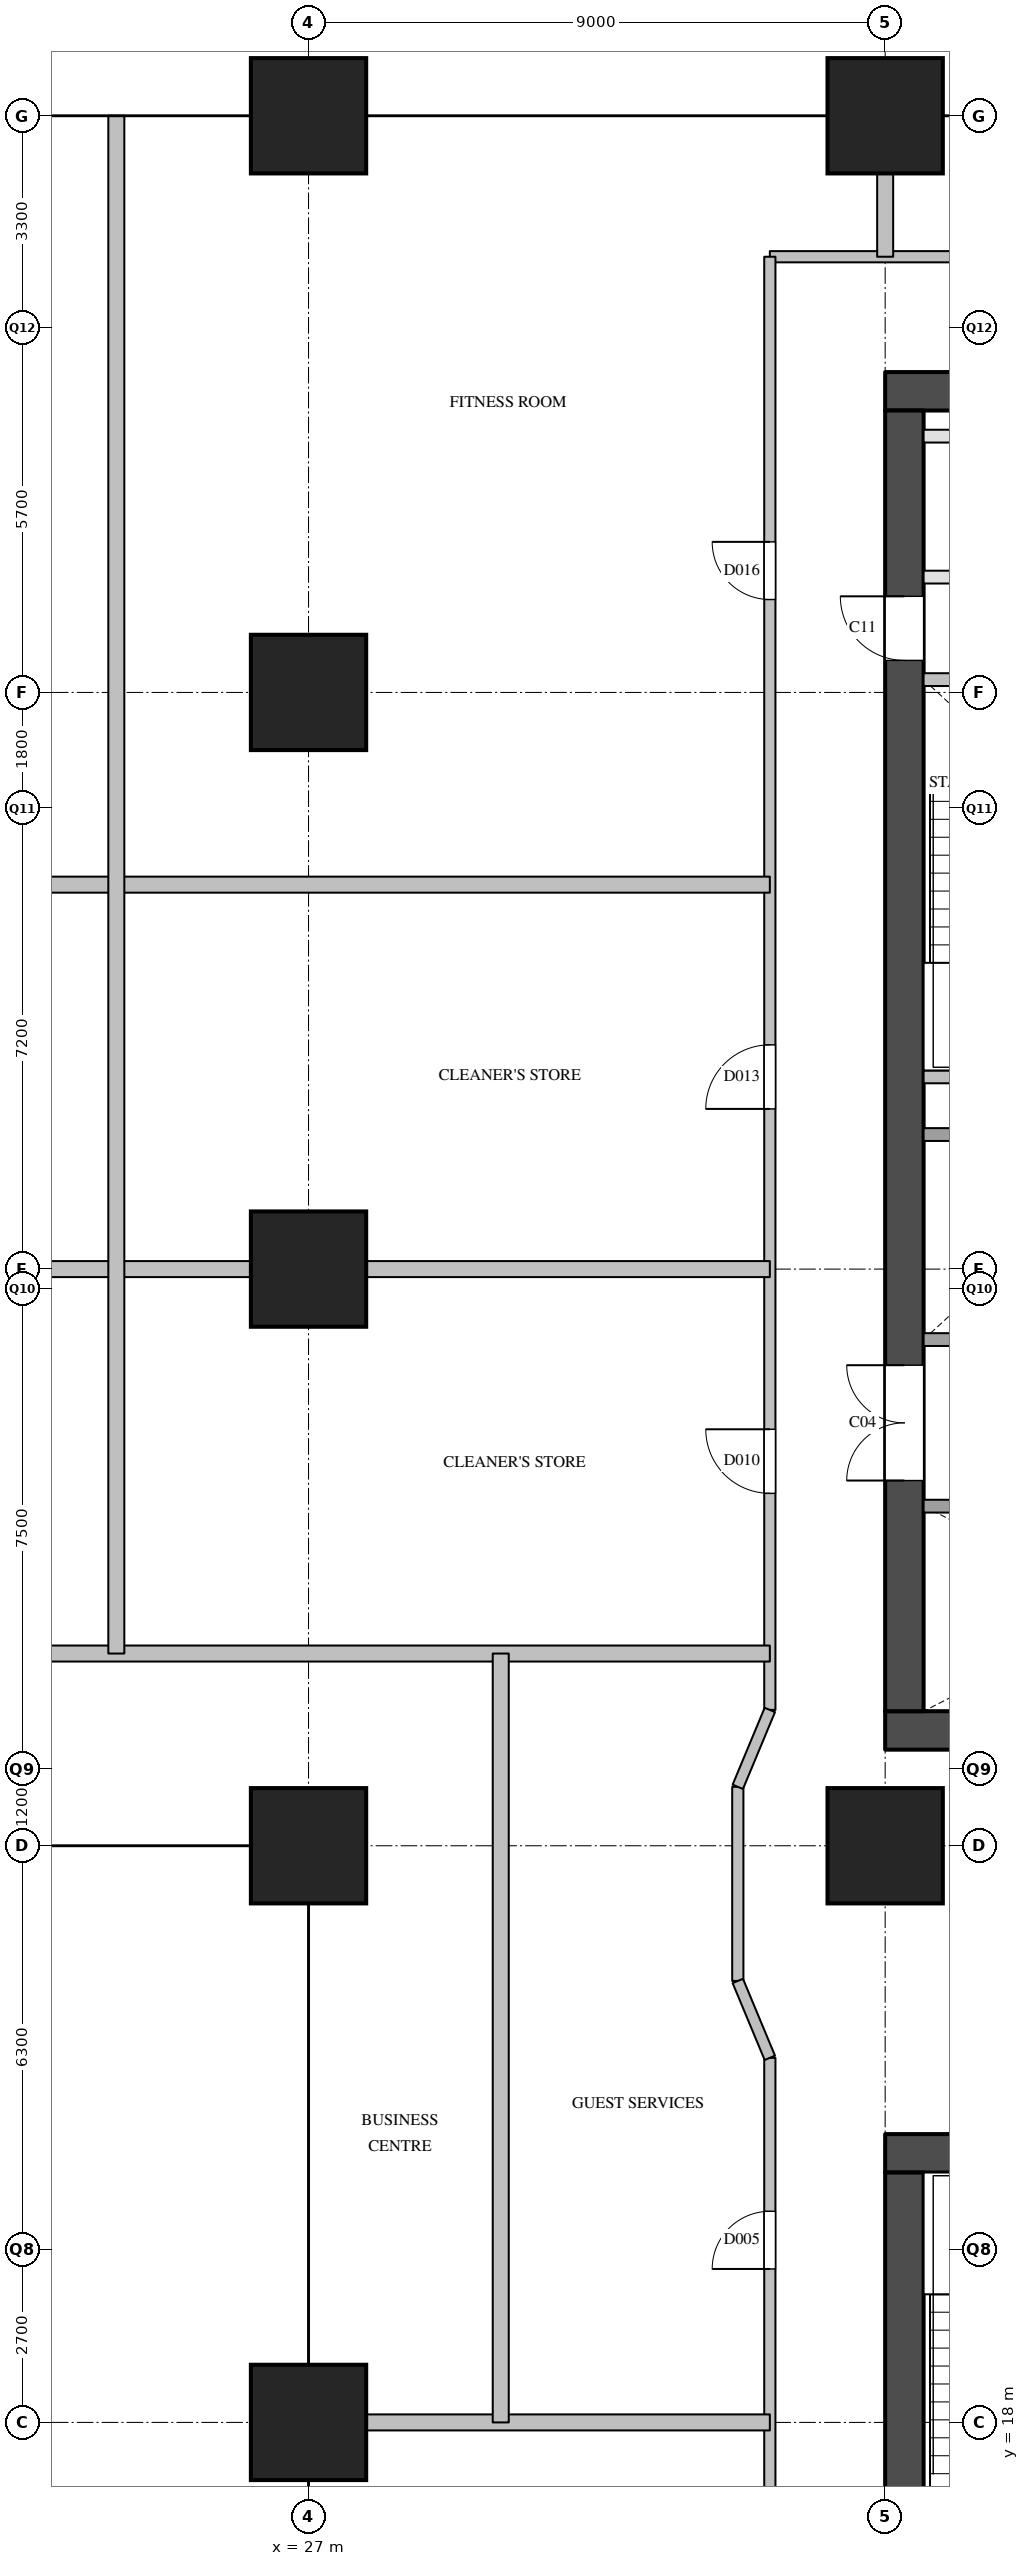
"""IFC4 building model, lengths in metres.
Left out: names, types, materials, properties, quantities, classifications, styles, units other than length and angle.
Written with IfcOpenShell. Run it as: python <this file> out.ifc"""

import sys

from ifc_helpers import new_model, si_unit, direction, frame, frame_2d, origin, origin_2d, place, context, subcontext, project, spatial, rectangle, extrude, element, fill, save


model = new_model("IFC4")
c1 = context("Model", 3, precision=1e-05, world=origin(), true_north=direction((0.0, 1.0)))
c2 = subcontext(c1, "Body", "Model", "MODEL_VIEW")
j1 = project(units=[si_unit("LENGTHUNIT", "METRE"), si_unit("PLANEANGLEUNIT", "RADIAN")], contexts=[c1])
p1 = place(None, origin())
s1 = spatial("IfcSite", under=j1, at=p1, CompositionType="ELEMENT")
p2 = place(p1, origin())
s2 = spatial("IfcBuilding", under=s1, at=p2, CompositionType="ELEMENT")
p3 = place(p2, frame((0.0, 0.0, 115.8)))
s3 = spatial("IfcBuildingStorey", under=s2, at=p3, CompositionType="ELEMENT", Elevation=115.8)
for number, where, z_axis, x_axis in (
    (1, (27.0, 18.0, 0.0), (0.0, 0.0, 1.0), (1.0, 0.0, 0.0)),
    (2, (27.0, 27.0, 0.0), (0.0, 0.0, 1.0), (1.0, 0.0, 0.0)),
    (3, (27.0, 36.0, 0.0), (0.0, 0.0, 1.0), (1.0, 0.0, 0.0)),
    (4, (27.0, 45.0, 0.0), (0.0, 0.0, 1.0), (1.0, 0.0, 0.0)),
    (5, (27.0, 54.0, 0.0), (0.0, 0.0, 1.0), (1.0, 0.0, 0.0)),
    (6, (36.0, 27.0, 0.0), (0.0, 0.0, 1.0), (1.0, 0.0, 0.0)),
    (7, (36.0, 54.0, 0.0), (0.0, 0.0, 1.0), (1.0, 0.0, 0.0)),
):
    element("IfcColumn", number, at=place(p3, frame(where, z_axis=z_axis, x_axis=x_axis)), inside=s3, PredefinedType="COLUMN", context=c2, shape_type="SweptSolid", body=[
        extrude(rectangle(XDim=1.8, YDim=1.8, at=origin_2d()), origin(), (0.0, 0.0, 1.0), 3.8),
    ])
for number, where, z_axis, x_axis in (
    (8, (36.0, 28.8, 0.0), (0.0, 0.0, 1.0), (1.0, 0.0, 0.0)),
    (9, (36.0, 49.7, 0.0), (0.0, 0.0, 1.0), (1.0, 0.0, 0.0)),
):
    element("IfcWall", number, at=place(p3, frame(where, z_axis=z_axis, x_axis=x_axis)), inside=s3, PredefinedType="SHEAR", context=c2, shape_type="SweptSolid", body=[
        extrude(rectangle(XDim=12.4, YDim=0.6, at=frame_2d((6.2, 0.0))), origin(), (0.0, 0.0, 1.0), 3.5),
    ])
p4 = place(p3, frame((36.3, 29.1, 0.0), z_axis=(0.0, 0.0, 1.0), x_axis=(0.0, 1.0, 0.0)))
e10 = element("IfcWall", 10, at=p4, inside=s3, PredefinedType="SHEAR", context=c2, shape_type="SweptSolid", body=[
    extrude(rectangle(XDim=20.3, YDim=0.6, at=frame_2d((10.15, 0.0))), origin(), (0.0, 0.0, 1.0), 3.5),
])
p5 = place(p4, frame((3.6, 0.0, 0.0)))
e11 = element("IfcOpeningElement", 11, at=p5, cuts=e10, PredefinedType="OPENING", context=c2, shape_type="SweptSolid", body=[
    extrude(rectangle(XDim=1.8, YDim=2.1, at=frame_2d((0.9, 1.05))), frame((0.0, 0.31, 0.0), z_axis=(0.0, -1.0, 0.0), x_axis=(1.0, 0.0, 0.0)), (0.0, 0.0, 1.0), 0.62),
])
p6 = place(p4, frame((16.4, 0.0, 0.0)))
e12 = element("IfcOpeningElement", 12, at=p6, cuts=e10, PredefinedType="OPENING", context=c2, shape_type="SweptSolid", body=[
    extrude(rectangle(XDim=1.0, YDim=2.1, at=frame_2d((0.5, 1.05))), frame((0.0, 0.31, 0.0), z_axis=(0.0, -1.0, 0.0), x_axis=(1.0, 0.0, 0.0)), (0.0, 0.0, 1.0), 0.62),
])
p7 = place(p3, frame((36.6, 32.3, 0.0), z_axis=(0.0, 0.0, 1.0), x_axis=(1.0, 0.0, 0.0)))
e13 = element("IfcWall", 13, at=p7, inside=s3, PredefinedType="SOLIDWALL", context=c2, shape_type="SweptSolid", body=[
    extrude(rectangle(XDim=11.2, YDim=0.2, at=frame_2d((5.6, 0.0))), origin(), (0.0, 0.0, 1.0), 3.5),
])
p8 = place(p7, frame((7.225, 0.0, 0.0)))
e14 = element("IfcOpeningElement", 14, at=p8, cuts=e13, PredefinedType="OPENING", context=c2, shape_type="SweptSolid", body=[
    extrude(rectangle(XDim=1.2, YDim=2.1, at=frame_2d((0.6, 1.05))), frame((0.0, 0.11, 0.0), z_axis=(0.0, -1.0, 0.0), x_axis=(1.0, 0.0, 0.0)), (0.0, 0.0, 1.0), 0.22),
])
p9 = place(p7, frame((9.475, 0.0, 0.0)))
e15 = element("IfcOpeningElement", 15, at=p9, cuts=e13, PredefinedType="OPENING", context=c2, shape_type="SweptSolid", body=[
    extrude(rectangle(XDim=1.2, YDim=2.1, at=frame_2d((0.6, 1.05))), frame((0.0, 0.11, 0.0), z_axis=(0.0, -1.0, 0.0), x_axis=(1.0, 0.0, 0.0)), (0.0, 0.0, 1.0), 0.22),
])
p10 = place(p3, frame((36.6, 34.9, 0.0), z_axis=(0.0, 0.0, 1.0), x_axis=(1.0, 0.0, 0.0)))
e16 = element("IfcWall", 16, at=p10, inside=s3, PredefinedType="SOLIDWALL", context=c2, shape_type="SweptSolid", body=[
    extrude(rectangle(XDim=6.3, YDim=0.2, at=frame_2d((3.15, 0.0))), origin(), (0.0, 0.0, 1.0), 3.5),
])
p11 = place(p3, frame((36.6, 38.1, 0.0), z_axis=(0.0, 0.0, 1.0), x_axis=(1.0, 0.0, 0.0)))
e17 = element("IfcWall", 17, at=p11, inside=s3, PredefinedType="SOLIDWALL", context=c2, shape_type="SweptSolid", body=[
    extrude(rectangle(XDim=6.7, YDim=0.2, at=frame_2d((3.35, 0.0))), origin(), (0.0, 0.0, 1.0), 3.5),
])
p12 = place(p3, frame((36.6, 39.0, 0.0), z_axis=(0.0, 0.0, 1.0), x_axis=(1.0, 0.0, 0.0)))
e18 = element("IfcWall", 18, at=p12, inside=s3, PredefinedType="SOLIDWALL", context=c2, shape_type="SweptSolid", body=[
    extrude(rectangle(XDim=3.25, YDim=0.2, at=frame_2d((1.625, 0.0))), origin(), (0.0, 0.0, 1.0), 3.5),
])
p13 = place(p3, frame((36.6, 45.2, 0.0), z_axis=(0.0, 0.0, 1.0), x_axis=(1.0, 0.0, 0.0)))
e19 = element("IfcWall", 19, at=p13, inside=s3, PredefinedType="SOLIDWALL", context=c2, shape_type="SweptSolid", body=[
    extrude(rectangle(XDim=10.05, YDim=0.2, at=frame_2d((5.025, 0.0))), origin(), (0.0, 0.0, 1.0), 3.5),
])
p14 = place(p13, frame((1.125, 0.0, 0.0)))
e20 = element("IfcOpeningElement", 20, at=p14, cuts=e19, PredefinedType="OPENING", context=c2, shape_type="SweptSolid", body=[
    extrude(rectangle(XDim=1.1, YDim=2.1, at=frame_2d((0.55, 1.05))), frame((0.0, 0.11, 0.0), z_axis=(0.0, -1.0, 0.0), x_axis=(1.0, 0.0, 0.0)), (0.0, 0.0, 1.0), 0.22),
])
p15 = place(p13, frame((4.475, 0.0, 0.0)))
e21 = element("IfcOpeningElement", 21, at=p15, cuts=e19, PredefinedType="OPENING", context=c2, shape_type="SweptSolid", body=[
    extrude(rectangle(XDim=1.1, YDim=2.1, at=frame_2d((0.55, 1.05))), frame((0.0, 0.11, 0.0), z_axis=(0.0, -1.0, 0.0), x_axis=(1.0, 0.0, 0.0)), (0.0, 0.0, 1.0), 0.22),
])
p16 = place(p13, frame((7.825, 0.0, 0.0)))
e22 = element("IfcOpeningElement", 22, at=p16, cuts=e19, PredefinedType="OPENING", context=c2, shape_type="SweptSolid", body=[
    extrude(rectangle(XDim=1.1, YDim=2.1, at=frame_2d((0.55, 1.05))), frame((0.0, 0.11, 0.0), z_axis=(0.0, -1.0, 0.0), x_axis=(1.0, 0.0, 0.0)), (0.0, 0.0, 1.0), 0.22),
])
p17 = place(p3, frame((36.6, 46.8, 0.0), z_axis=(0.0, 0.0, 1.0), x_axis=(1.0, 0.0, 0.0)))
e23 = element("IfcWall", 23, at=p17, inside=s3, PredefinedType="PARTITIONING", context=c2, shape_type="SweptSolid", body=[
    extrude(rectangle(XDim=11.2, YDim=0.2, at=frame_2d((5.6, 0.0))), origin(), (0.0, 0.0, 1.0), 3.5),
])
p18 = place(p17, frame((2.35, 0.0, 0.0)))
e24 = element("IfcOpeningElement", 24, at=p18, cuts=e23, PredefinedType="OPENING", context=c2, shape_type="SweptSolid", body=[
    extrude(rectangle(XDim=0.9, YDim=2.1, at=frame_2d((0.45, 1.05))), frame((0.0, 0.11, 0.0), z_axis=(0.0, -1.0, 0.0), x_axis=(1.0, 0.0, 0.0)), (0.0, 0.0, 1.0), 0.22),
])
p19 = place(p17, frame((7.95, 0.0, 0.0)))
e25 = element("IfcOpeningElement", 25, at=p19, cuts=e23, PredefinedType="OPENING", context=c2, shape_type="SweptSolid", body=[
    extrude(rectangle(XDim=0.9, YDim=2.1, at=frame_2d((0.45, 1.05))), frame((0.0, 0.11, 0.0), z_axis=(0.0, -1.0, 0.0), x_axis=(1.0, 0.0, 0.0)), (0.0, 0.0, 1.0), 0.22),
])
p20 = place(p3, frame((36.6, 49.0, 0.0), z_axis=(0.0, 0.0, 1.0), x_axis=(1.0, 0.0, 0.0)))
e26 = element("IfcWall", 26, at=p20, inside=s3, PredefinedType="PARTITIONING", context=c2, shape_type="SweptSolid", body=[
    extrude(rectangle(XDim=11.2, YDim=0.2, at=frame_2d((5.6, 0.0))), origin(), (0.0, 0.0, 1.0), 3.5),
])
p21 = place(p3, frame((36.0, 22.2, 0.0), z_axis=(0.0, 0.0, 1.0), x_axis=(1.0, 0.0, 0.0)))
e27 = element("IfcWall", 27, at=p21, inside=s3, PredefinedType="SHEAR", context=c2, shape_type="SweptSolid", body=[
    extrude(rectangle(XDim=9.0, YDim=0.6, at=frame_2d((4.5, 0.0))), origin(), (0.0, 0.0, 1.0), 3.5),
])
p22 = place(p3, frame((36.3, 9.6, 0.0), z_axis=(0.0, 0.0, 1.0), x_axis=(0.0, 1.0, 0.0)))
e28 = element("IfcWall", 28, at=p22, inside=s3, PredefinedType="SHEAR", context=c2, shape_type="SweptSolid", body=[
    extrude(rectangle(XDim=12.3, YDim=0.6, at=frame_2d((6.15, 0.0))), origin(), (0.0, 0.0, 1.0), 3.5),
])
p23 = place(p22, frame((0.525, 0.0, 0.0)))
e29 = element("IfcOpeningElement", 29, at=p23, cuts=e28, PredefinedType="OPENING", context=c2, shape_type="SweptSolid", body=[
    extrude(rectangle(XDim=1.2, YDim=2.1, at=frame_2d((0.6, 1.05))), frame((0.0, 0.31, 0.0), z_axis=(0.0, -1.0, 0.0), x_axis=(1.0, 0.0, 0.0)), (0.0, 0.0, 1.0), 0.62),
])
p24 = place(p22, frame((4.8, 0.0, 0.0)))
e30 = element("IfcOpeningElement", 30, at=p24, cuts=e28, PredefinedType="OPENING", context=c2, shape_type="SweptSolid", body=[
    extrude(rectangle(XDim=1.0, YDim=2.1, at=frame_2d((0.5, 1.05))), frame((0.0, 0.31, 0.0), z_axis=(0.0, -1.0, 0.0), x_axis=(1.0, 0.0, 0.0)), (0.0, 0.0, 1.0), 0.62),
])
p25 = place(p3, frame((34.2, 51.8, 0.0), z_axis=(0.0, 0.0, 1.0), x_axis=(1.0, 0.0, 0.0)))
e31 = element("IfcWall", 31, at=p25, inside=s3, PredefinedType="PARTITIONING", context=c2, shape_type="SweptSolid", body=[
    extrude(rectangle(XDim=16.0, YDim=0.175, at=frame_2d((8.0, 0.0))), origin(), (0.0, 0.0, 1.0), 3.5),
])
p26 = place(p25, frame((4.3, 0.0, 0.0)))
e32 = element("IfcOpeningElement", 32, at=p26, cuts=e31, PredefinedType="OPENING", context=c2, shape_type="SweptSolid", body=[
    extrude(rectangle(XDim=1.0, YDim=2.1, at=frame_2d((0.5, 1.05))), frame((0.0, 0.097, 0.0), z_axis=(0.0, -1.0, 0.0), x_axis=(1.0, 0.0, 0.0)), (0.0, 0.0, 1.0), 0.195),
])
p27 = place(p25, frame((11.963, 0.0, 0.0)))
e33 = element("IfcOpeningElement", 33, at=p27, cuts=e31, PredefinedType="OPENING", context=c2, shape_type="SweptSolid", body=[
    extrude(rectangle(XDim=0.9, YDim=2.1, at=frame_2d((0.45, 1.05))), frame((0.0, 0.097, 0.0), z_axis=(0.0, -1.0, 0.0), x_axis=(1.0, 0.0, 0.0)), (0.0, 0.0, 1.0), 0.195),
])
p28 = place(p3, frame((33.7, 24.89, 0.0), z_axis=(0.0, 0.0, 1.0), x_axis=(0.0, 1.0, 0.0)))
e34 = element("IfcWall", 34, at=p28, inside=s3, PredefinedType="PARTITIONING", context=c2, shape_type="SweptSolid", body=[
    extrude(rectangle(XDim=3.03, YDim=0.175, at=frame_2d((1.515, 0.0))), origin(), (0.0, 0.0, 1.0), 2.5),
])
p29 = place(p3, frame((34.2, 7.2, 0.0), z_axis=(0.0, 0.0, 1.0), x_axis=(0.0, 1.0, 0.0)))
e35 = element("IfcWall", 35, at=p29, inside=s3, PredefinedType="PARTITIONING", context=c2, shape_type="SweptSolid", body=[
    extrude(rectangle(XDim=16.49, YDim=0.175, at=frame_2d((8.245, 0.0))), origin(), (0.0, 0.0, 1.0), 3.5),
])
p30 = place(p29, frame((4.95, 0.0, 0.0)))
e36 = element("IfcOpeningElement", 36, at=p30, cuts=e35, PredefinedType="OPENING", context=c2, shape_type="SweptSolid", body=[
    extrude(rectangle(XDim=0.9, YDim=2.1, at=frame_2d((0.45, 1.05))), frame((0.0, 0.097, 0.0), z_axis=(0.0, -1.0, 0.0), x_axis=(1.0, 0.0, 0.0)), (0.0, 0.0, 1.0), 0.195),
])
p31 = place(p29, frame((13.195, 0.0, 0.0)))
e37 = element("IfcOpeningElement", 37, at=p31, cuts=e35, PredefinedType="OPENING", context=c2, shape_type="SweptSolid", body=[
    extrude(rectangle(XDim=0.9, YDim=2.1, at=frame_2d((0.45, 1.05))), frame((0.0, 0.097, 0.0), z_axis=(0.0, -1.0, 0.0), x_axis=(1.0, 0.0, 0.0)), (0.0, 0.0, 1.0), 0.195),
])
p32 = place(p3, frame((34.2, 29.12, 0.0), z_axis=(0.0, 0.0, 1.0), x_axis=(0.0, 1.0, 0.0)))
e38 = element("IfcWall", 38, at=p32, inside=s3, PredefinedType="PARTITIONING", context=c2, shape_type="SweptSolid", body=[
    extrude(rectangle(XDim=22.68, YDim=0.175, at=frame_2d((11.34, 0.0))), origin(), (0.0, 0.0, 1.0), 3.5),
])
p33 = place(p32, frame((3.38, 0.0, 0.0)))
e39 = element("IfcOpeningElement", 39, at=p33, cuts=e38, PredefinedType="OPENING", context=c2, shape_type="SweptSolid", body=[
    extrude(rectangle(XDim=1.0, YDim=2.1, at=frame_2d((0.5, 1.05))), frame((0.0, 0.097, 0.0), z_axis=(0.0, -1.0, 0.0), x_axis=(1.0, 0.0, 0.0)), (0.0, 0.0, 1.0), 0.195),
])
p34 = place(p32, frame((9.38, 0.0, 0.0)))
e40 = element("IfcOpeningElement", 40, at=p34, cuts=e38, PredefinedType="OPENING", context=c2, shape_type="SweptSolid", body=[
    extrude(rectangle(XDim=1.0, YDim=2.1, at=frame_2d((0.5, 1.05))), frame((0.0, 0.097, 0.0), z_axis=(0.0, -1.0, 0.0), x_axis=(1.0, 0.0, 0.0)), (0.0, 0.0, 1.0), 0.195),
])
p35 = place(p32, frame((17.33, 0.0, 0.0)))
e41 = element("IfcOpeningElement", 41, at=p35, cuts=e38, PredefinedType="OPENING", context=c2, shape_type="SweptSolid", body=[
    extrude(rectangle(XDim=0.9, YDim=2.1, at=frame_2d((0.45, 1.05))), frame((0.0, 0.097, 0.0), z_axis=(0.0, -1.0, 0.0), x_axis=(1.0, 0.0, 0.0)), (0.0, 0.0, 1.0), 0.195),
])
p36 = place(p3, frame((27.0, 18.0, 0.0), z_axis=(0.0, 0.0, 1.0), x_axis=(1.0, 0.0, 0.0)))
e42 = element("IfcWall", 42, at=p36, inside=s3, PredefinedType="PARTITIONING", context=c2, shape_type="SweptSolid", body=[
    extrude(rectangle(XDim=7.2, YDim=0.25, at=frame_2d((3.6, 0.0))), origin(), (0.0, 0.0, 1.0), 3.5),
])
p37 = place(p3, frame((19.8, 30.0, 0.0), z_axis=(0.0, 0.0, 1.0), x_axis=(1.0, 0.0, 0.0)))
e43 = element("IfcWall", 43, at=p37, inside=s3, PredefinedType="PARTITIONING", context=c2, shape_type="SweptSolid", body=[
    extrude(rectangle(XDim=14.4, YDim=0.25, at=frame_2d((7.2, 0.0))), origin(), (0.0, 0.0, 1.0), 2.5),
])
p38 = place(p3, frame((19.8, 36.0, 0.0), z_axis=(0.0, 0.0, 1.0), x_axis=(1.0, 0.0, 0.0)))
e44 = element("IfcWall", 44, at=p38, inside=s3, PredefinedType="PARTITIONING", context=c2, shape_type="SweptSolid", body=[
    extrude(rectangle(XDim=14.4, YDim=0.25, at=frame_2d((7.2, 0.0))), origin(), (0.0, 0.0, 1.0), 3.5),
])
p39 = place(p3, frame((19.8, 42.0, 0.0), z_axis=(0.0, 0.0, 1.0), x_axis=(1.0, 0.0, 0.0)))
e45 = element("IfcWall", 45, at=p39, inside=s3, PredefinedType="PARTITIONING", context=c2, shape_type="SweptSolid", body=[
    extrude(rectangle(XDim=14.4, YDim=0.25, at=frame_2d((7.2, 0.0))), origin(), (0.0, 0.0, 1.0), 2.5),
])
p40 = place(p3, frame((24.0, 30.0, 0.0), z_axis=(0.0, 0.0, 1.0), x_axis=(0.0, 1.0, 0.0)))
e46 = element("IfcWall", 46, at=p40, inside=s3, PredefinedType="PARTITIONING", context=c2, shape_type="SweptSolid", body=[
    extrude(rectangle(XDim=24.0, YDim=0.25, at=frame_2d((12.0, 0.0))), origin(), (0.0, 0.0, 1.0), 2.5),
])
p41 = place(p3, frame((30.0, 18.0, 0.0), z_axis=(0.0, 0.0, 1.0), x_axis=(0.0, 1.0, 0.0)))
e47 = element("IfcWall", 47, at=p41, inside=s3, PredefinedType="PARTITIONING", context=c2, shape_type="SweptSolid", body=[
    extrude(rectangle(XDim=12.0, YDim=0.25, at=frame_2d((6.0, 0.0))), origin(), (0.0, 0.0, 1.0), 2.5),
])
p42 = place(p3, frame((36.0, 51.8, 0.0), z_axis=(0.0, 0.0, 1.0), x_axis=(0.0, 1.0, 0.0)))
e48 = element("IfcWall", 48, at=p42, inside=s3, PredefinedType="PARTITIONING", context=c2, shape_type="SweptSolid", body=[
    extrude(rectangle(XDim=2.2, YDim=0.25, at=frame_2d((1.1, 0.0))), origin(), (0.0, 0.0, 1.0), 3.5),
])
p43 = place(p3, frame((34.2, 23.69, 0.0), z_axis=(0.0, 0.0, 1.0), x_axis=(-0.384628719983, 0.923071366561, 0.0)))
e49 = element("IfcWall", 49, at=p43, inside=s3, PredefinedType="PARTITIONING", context=c2, shape_type="SweptSolid", body=[
    extrude(rectangle(XDim=1.3, YDim=0.175, at=frame_2d((0.65, 0.0))), origin(), (0.0, 0.0, 1.0), 3.5),
])
p44 = place(p3, frame((33.7, 27.92, 0.0), z_axis=(0.0, 0.0, 1.0), x_axis=(0.384562051588, 0.923099143363, 0.0)))
e50 = element("IfcWall", 50, at=p44, inside=s3, PredefinedType="PARTITIONING", context=c2, shape_type="SweptSolid", body=[
    extrude(rectangle(XDim=1.3, YDim=0.175, at=frame_2d((0.65, 0.0))), origin(), (0.0, 0.0, 1.0), 3.5),
])
p45 = place(p5, origin())
e51 = element("IfcDoor", 51, at=p45, inside=s3, OperationType="DOUBLE_DOOR_SINGLE_SWING", PredefinedType="DOOR", context=c2, shape_type="SweptSolid", body=[
    extrude(rectangle(XDim=1.8, YDim=2.1, at=frame_2d((0.9, 1.05))), frame((0.0, 0.025, 0.0), z_axis=(0.0, -1.0, 0.0), x_axis=(1.0, 0.0, 0.0)), (0.0, 0.0, 1.0), 0.05),
])
fill(e11, e51)
p46 = place(p6, origin())
e52 = element("IfcDoor", 52, at=p46, inside=s3, OperationType="SINGLE_SWING_RIGHT", PredefinedType="DOOR", context=c2, shape_type="SweptSolid", body=[
    extrude(rectangle(XDim=1.0, YDim=2.1, at=frame_2d((0.5, 1.05))), frame((0.0, 0.025, 0.0), z_axis=(0.0, -1.0, 0.0), x_axis=(1.0, 0.0, 0.0)), (0.0, 0.0, 1.0), 0.05),
])
fill(e12, e52)
p47 = place(p31, origin())
e53 = element("IfcDoor", 53, at=p47, inside=s3, OperationType="SINGLE_SWING_LEFT", PredefinedType="DOOR", context=c2, shape_type="SweptSolid", body=[
    extrude(rectangle(XDim=0.9, YDim=2.1, at=frame_2d((0.45, 1.05))), frame((0.0, 0.025, 0.0), z_axis=(0.0, -1.0, 0.0), x_axis=(1.0, 0.0, 0.0)), (0.0, 0.0, 1.0), 0.05),
])
fill(e37, e53)
p48 = place(p33, origin())
e54 = element("IfcDoor", 54, at=p48, inside=s3, OperationType="SINGLE_SWING_RIGHT", PredefinedType="DOOR", context=c2, shape_type="SweptSolid", body=[
    extrude(rectangle(XDim=1.0, YDim=2.1, at=frame_2d((0.5, 1.05))), frame((0.0, 0.025, 0.0), z_axis=(0.0, -1.0, 0.0), x_axis=(1.0, 0.0, 0.0)), (0.0, 0.0, 1.0), 0.05),
])
fill(e39, e54)
p49 = place(p34, origin())
e55 = element("IfcDoor", 55, at=p49, inside=s3, OperationType="SINGLE_SWING_LEFT", PredefinedType="DOOR", context=c2, shape_type="SweptSolid", body=[
    extrude(rectangle(XDim=1.0, YDim=2.1, at=frame_2d((0.5, 1.05))), frame((0.0, 0.025, 0.0), z_axis=(0.0, -1.0, 0.0), x_axis=(1.0, 0.0, 0.0)), (0.0, 0.0, 1.0), 0.05),
])
fill(e40, e55)
p50 = place(p35, origin())
e56 = element("IfcDoor", 56, at=p50, inside=s3, OperationType="SINGLE_SWING_RIGHT", PredefinedType="DOOR", context=c2, shape_type="SweptSolid", body=[
    extrude(rectangle(XDim=0.9, YDim=2.1, at=frame_2d((0.45, 1.05))), frame((0.0, 0.025, 0.0), z_axis=(0.0, -1.0, 0.0), x_axis=(1.0, 0.0, 0.0)), (0.0, 0.0, 1.0), 0.05),
])
fill(e41, e56)
save(model, sys.argv[1])
